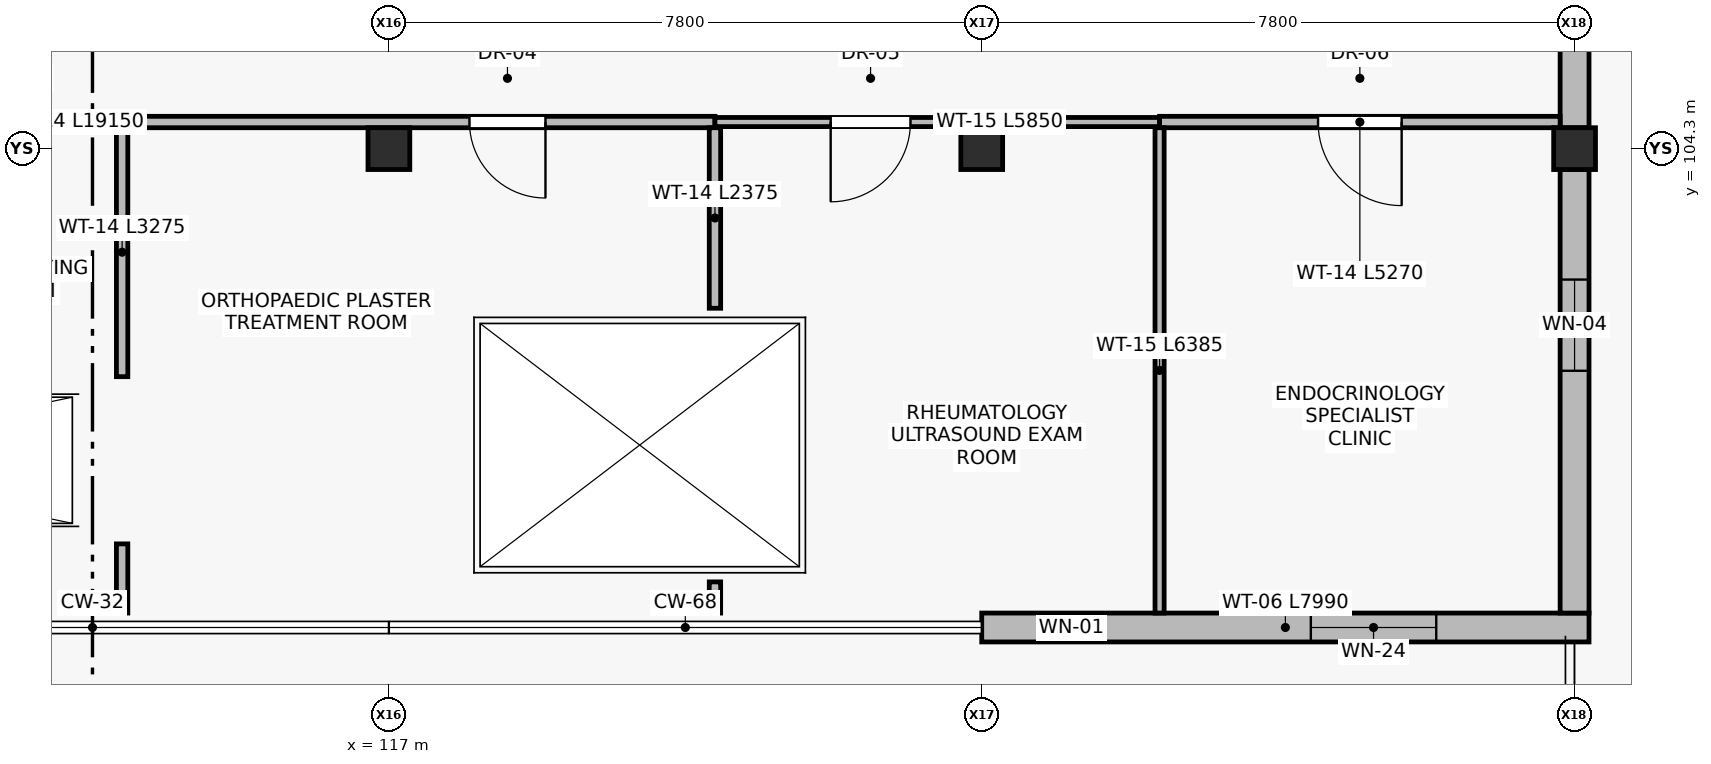
"""IFC4 building model, lengths in metres.
Left out: names, types, materials, properties, quantities, classifications, styles, units other than length and angle.
Written with IfcOpenShell. Run it as: python <this file> out.ifc"""

import sys

from ifc_helpers import new_model, si_unit, direction, frame, frame_2d, origin, origin_2d, place, context, subcontext, project, spatial, rectangle, extrude, element, fill, save


model = new_model("IFC4")
c1 = context("Model", 3, precision=1e-05, world=origin(), true_north=direction((0.0, 1.0)))
c2 = subcontext(c1, "Body", "Model", "MODEL_VIEW")
j1 = project(units=[si_unit("LENGTHUNIT", "METRE"), si_unit("PLANEANGLEUNIT", "RADIAN")], contexts=[c1])
p1 = place(None, origin())
s1 = spatial("IfcSite", under=j1, at=p1, CompositionType="ELEMENT")
p2 = place(p1, origin())
s2 = spatial("IfcBuilding", under=s1, at=p2, CompositionType="ELEMENT")
p3 = place(p2, frame((0.0, 0.0, 9.6)))
s3 = spatial("IfcBuildingStorey", under=s2, at=p3, CompositionType="ELEMENT", Elevation=9.6)
for number, where, z_axis, x_axis in (
    (1, (117.0, 104.3, 0.0), (0.0, 0.0, 1.0), (1.0, 0.0, 0.0)),
    (2, (124.8, 104.3, 0.0), (0.0, 0.0, 1.0), (1.0, 0.0, 0.0)),
    (3, (132.6, 104.3, 0.0), (0.0, 0.0, 1.0), (1.0, 0.0, 0.0)),
):
    element("IfcColumn", number, at=place(p3, frame(where, z_axis=z_axis, x_axis=x_axis)), inside=s3, PredefinedType="COLUMN", context=c2, shape_type="SweptSolid", body=[
        extrude(rectangle(XDim=0.55, YDim=0.55, at=origin_2d()), origin(), (0.0, 0.0, 1.0), 4.5),
    ])
p4 = place(p3, frame((132.79, 98.0, 0.0), z_axis=(0.0, 0.0, 1.0), x_axis=(-1.0, 0.0, 0.0)))
e4 = element("IfcWall", 4, at=p4, inside=s3, PredefinedType="STANDARD", context=c2, shape_type="SweptSolid", body=[
    extrude(rectangle(XDim=7.99, YDim=0.38, at=frame_2d((3.995, 0.0))), origin(), (0.0, 0.0, 1.0), 4.24),
])
p5 = place(p4, frame((2.01, 0.0, 0.9)))
e5 = element("IfcOpeningElement", 5, at=p5, cuts=e4, PredefinedType="OPENING", context=c2, shape_type="SweptSolid", body=[
    extrude(rectangle(XDim=1.65, YDim=1.5, at=frame_2d((0.825, 0.75))), frame((0.0, 0.2, 0.0), z_axis=(0.0, -1.0, 0.0), x_axis=(1.0, 0.0, 0.0)), (0.0, 0.0, 1.0), 0.4),
])
p6 = place(p4, frame((6.36, 0.0, 0.9)))
e6 = element("IfcOpeningElement", 6, at=p6, cuts=e4, PredefinedType="OPENING", context=c2, shape_type="SweptSolid", body=[
    extrude(rectangle(XDim=0.9, YDim=1.6, at=frame_2d((0.45, 0.8))), frame((0.0, 0.2, 0.0), z_axis=(0.0, -1.0, 0.0), x_axis=(1.0, 0.0, 0.0)), (0.0, 0.0, 1.0), 0.4),
])
p7 = place(p3, frame((132.6, 104.025, 0.0), z_axis=(0.0, 0.0, 1.0), x_axis=(0.0, -1.0, 0.0)))
e7 = element("IfcWall", 7, at=p7, inside=s3, PredefinedType="STANDARD", context=c2, shape_type="SweptSolid", body=[
    extrude(rectangle(XDim=5.835, YDim=0.38, at=frame_2d((2.917, 0.0))), origin(), (0.0, 0.0, 1.0), 3.84),
])
p8 = place(p7, frame((1.448, 0.0, 0.9)))
e8 = element("IfcOpeningElement", 8, at=p8, cuts=e7, PredefinedType="OPENING", context=c2, shape_type="SweptSolid", body=[
    extrude(rectangle(XDim=1.2, YDim=1.5, at=frame_2d((0.6, 0.75))), frame((0.0, 0.2, 0.0), z_axis=(0.0, -1.0, 0.0), x_axis=(1.0, 0.0, 0.0)), (0.0, 0.0, 1.0), 0.4),
])
p9 = place(p3, frame((132.6, 107.925, 0.0), z_axis=(0.0, 0.0, 1.0), x_axis=(0.0, -1.0, 0.0)))
e9 = element("IfcWall", 9, at=p9, inside=s3, PredefinedType="STANDARD", context=c2, shape_type="SweptSolid", body=[
    extrude(rectangle(XDim=3.35, YDim=0.38, at=frame_2d((1.675, 0.0))), origin(), (0.0, 0.0, 1.0), 3.84),
])
p10 = place(p9, frame((1.05, 0.0, 0.0)))
e10 = element("IfcOpeningElement", 10, at=p10, cuts=e9, PredefinedType="OPENING", context=c2, shape_type="SweptSolid", body=[
    extrude(rectangle(XDim=1.25, YDim=2.2, at=frame_2d((0.625, 1.1))), frame((0.0, 0.2, 0.0), z_axis=(0.0, -1.0, 0.0), x_axis=(1.0, 0.0, 0.0)), (0.0, 0.0, 1.0), 0.4),
])
p11 = place(p3, frame((113.49, 104.65, 0.0), z_axis=(0.0, 0.0, 1.0), x_axis=(-1.0, 0.0, 0.0)))
e11 = element("IfcWall", 11, at=p11, inside=s3, PredefinedType="PARTITIONING", context=c2, shape_type="SweptSolid", body=[
    extrude(rectangle(XDim=4.95, YDim=0.15, at=frame_2d((2.475, 0.0))), origin(), (0.0, 0.0, 1.0), 3.74),
])
p12 = place(p11, frame((2.025, 0.0, 0.0)))
e12 = element("IfcOpeningElement", 12, at=p12, cuts=e11, PredefinedType="OPENING", context=c2, shape_type="SweptSolid", body=[
    extrude(rectangle(XDim=0.9, YDim=2.1, at=frame_2d((0.45, 1.05))), frame((0.0, 0.085, 0.0), z_axis=(0.0, -1.0, 0.0), x_axis=(1.0, 0.0, 0.0)), (0.0, 0.0, 1.0), 0.17),
])
p13 = place(p3, frame((121.29, 104.65, 0.0), z_axis=(0.0, 0.0, 1.0), x_axis=(-1.0, 0.0, 0.0)))
e13 = element("IfcWall", 13, at=p13, inside=s3, PredefinedType="PARTITIONING", context=c2, shape_type="SweptSolid", body=[
    extrude(rectangle(XDim=7.8, YDim=0.15, at=frame_2d((3.9, 0.0))), origin(), (0.0, 0.0, 1.0), 3.74),
])
p14 = place(p13, frame((2.23, 0.0, 0.0)))
e14 = element("IfcOpeningElement", 14, at=p14, cuts=e13, PredefinedType="OPENING", context=c2, shape_type="SweptSolid", body=[
    extrude(rectangle(XDim=1.0, YDim=2.1, at=frame_2d((0.5, 1.05))), frame((0.0, 0.085, 0.0), z_axis=(0.0, -1.0, 0.0), x_axis=(1.0, 0.0, 0.0)), (0.0, 0.0, 1.0), 0.17),
])
p15 = place(p3, frame((127.14, 104.65, 0.0), z_axis=(0.0, 0.0, 1.0), x_axis=(-1.0, 0.0, 0.0)))
e15 = element("IfcWall", 15, at=p15, inside=s3, PredefinedType="PARTITIONING", context=c2, shape_type="SweptSolid", body=[
    extrude(rectangle(XDim=5.85, YDim=0.12, at=frame_2d((2.925, 0.0))), origin(), (0.0, 0.0, 1.0), 3.74),
])
p16 = place(p15, frame((3.278, 0.0, 0.0)))
e16 = element("IfcOpeningElement", 16, at=p16, cuts=e15, PredefinedType="OPENING", context=c2, shape_type="SweptSolid", body=[
    extrude(rectangle(XDim=1.05, YDim=2.15, at=frame_2d((0.525, 1.075))), frame((0.0, 0.07, 0.0), z_axis=(0.0, -1.0, 0.0), x_axis=(1.0, 0.0, 0.0)), (0.0, 0.0, 1.0), 0.14),
])
p17 = place(p3, frame((132.41, 104.65, 0.0), z_axis=(0.0, 0.0, 1.0), x_axis=(-1.0, 0.0, 0.0)))
e17 = element("IfcWall", 17, at=p17, inside=s3, PredefinedType="PARTITIONING", context=c2, shape_type="SweptSolid", body=[
    extrude(rectangle(XDim=5.27, YDim=0.15, at=frame_2d((2.635, 0.0))), origin(), (0.0, 0.0, 1.0), 3.74),
])
p18 = place(p17, frame((2.085, 0.0, 0.0)))
e18 = element("IfcOpeningElement", 18, at=p18, cuts=e17, PredefinedType="OPENING", context=c2, shape_type="SweptSolid", body=[
    extrude(rectangle(XDim=1.1, YDim=2.15, at=frame_2d((0.55, 1.075))), frame((0.0, 0.085, 0.0), z_axis=(0.0, -1.0, 0.0), x_axis=(1.0, 0.0, 0.0)), (0.0, 0.0, 1.0), 0.17),
])
p19 = place(p3, frame((113.49, 98.19, 0.0), z_axis=(0.0, 0.0, 1.0), x_axis=(0.0, 1.0, 0.0)))
e19 = element("IfcWall", 19, at=p19, inside=s3, PredefinedType="PARTITIONING", context=c2, shape_type="SweptSolid", body=[
    extrude(rectangle(XDim=0.91, YDim=0.15, at=frame_2d((0.455, 0.0))), origin(), (0.0, 0.0, 1.0), 4.24),
])
p20 = place(p3, frame((113.49, 101.3, 0.0), z_axis=(0.0, 0.0, 1.0), x_axis=(0.0, 1.0, 0.0)))
e20 = element("IfcWall", 20, at=p20, inside=s3, PredefinedType="PARTITIONING", context=c2, shape_type="SweptSolid", body=[
    extrude(rectangle(XDim=3.275, YDim=0.15, at=frame_2d((1.637, 0.0))), origin(), (0.0, 0.0, 1.0), 4.24),
])
p21 = place(p3, frame((121.29, 98.19, 0.0), z_axis=(0.0, 0.0, 1.0), x_axis=(0.0, 1.0, 0.0)))
e21 = element("IfcWall", 21, at=p21, inside=s3, PredefinedType="PARTITIONING", context=c2, shape_type="SweptSolid", body=[
    extrude(rectangle(XDim=0.41, YDim=0.15, at=frame_2d((0.205, 0.0))), origin(), (0.0, 0.0, 1.0), 4.24),
])
p22 = place(p3, frame((121.29, 102.2, 0.0), z_axis=(0.0, 0.0, 1.0), x_axis=(0.0, 1.0, 0.0)))
e22 = element("IfcWall", 22, at=p22, inside=s3, PredefinedType="PARTITIONING", context=c2, shape_type="SweptSolid", body=[
    extrude(rectangle(XDim=2.375, YDim=0.15, at=frame_2d((1.188, 0.0))), origin(), (0.0, 0.0, 1.0), 4.24),
])
p23 = place(p3, frame((127.14, 98.19, 0.0), z_axis=(0.0, 0.0, 1.0), x_axis=(0.0, 1.0, 0.0)))
e23 = element("IfcWall", 23, at=p23, inside=s3, PredefinedType="PARTITIONING", context=c2, shape_type="SweptSolid", body=[
    extrude(rectangle(XDim=6.385, YDim=0.12, at=frame_2d((3.192, 0.0))), origin(), (0.0, 0.0, 1.0), 3.94),
])
p24 = place(p5, origin())
e24 = element("IfcWindow", 24, at=p24, inside=s3, PartitioningType="SINGLE_PANEL", PredefinedType="WINDOW", context=c2, shape_type="SweptSolid", body=[
    extrude(rectangle(XDim=1.65, YDim=1.5, at=frame_2d((0.825, 0.75))), frame((0.0, 0.03, 0.0), z_axis=(0.0, -1.0, 0.0), x_axis=(1.0, 0.0, 0.0)), (0.0, 0.0, 1.0), 0.06),
])
fill(e5, e24)
p25 = place(p6, origin())
e25 = element("IfcWindow", 25, at=p25, inside=s3, PartitioningType="SINGLE_PANEL", PredefinedType="WINDOW", context=c2, shape_type="SweptSolid", body=[
    extrude(rectangle(XDim=0.9, YDim=1.6, at=frame_2d((0.45, 0.8))), frame((0.0, 0.03, 0.0), z_axis=(0.0, -1.0, 0.0), x_axis=(1.0, 0.0, 0.0)), (0.0, 0.0, 1.0), 0.06),
])
fill(e6, e25)
p26 = place(p8, origin())
e26 = element("IfcWindow", 26, at=p26, inside=s3, PartitioningType="SINGLE_PANEL", PredefinedType="WINDOW", context=c2, shape_type="SweptSolid", body=[
    extrude(rectangle(XDim=1.2, YDim=1.5, at=frame_2d((0.6, 0.75))), frame((0.0, 0.03, 0.0), z_axis=(0.0, -1.0, 0.0), x_axis=(1.0, 0.0, 0.0)), (0.0, 0.0, 1.0), 0.06),
])
fill(e8, e26)
p27 = place(p14, origin())
e27 = element("IfcDoor", 27, at=p27, inside=s3, OperationType="SINGLE_SWING_LEFT", PredefinedType="DOOR", context=c2, shape_type="SweptSolid", body=[
    extrude(rectangle(XDim=1.0, YDim=2.1, at=frame_2d((0.5, 1.05))), frame((0.0, 0.025, 0.0), z_axis=(0.0, -1.0, 0.0), x_axis=(1.0, 0.0, 0.0)), (0.0, 0.0, 1.0), 0.05),
])
fill(e14, e27)
p28 = place(p16, origin())
e28 = element("IfcDoor", 28, at=p28, inside=s3, OperationType="SINGLE_SWING_RIGHT", PredefinedType="DOOR", context=c2, shape_type="SweptSolid", body=[
    extrude(rectangle(XDim=1.05, YDim=2.15, at=frame_2d((0.525, 1.075))), frame((0.0, 0.025, 0.0), z_axis=(0.0, -1.0, 0.0), x_axis=(1.0, 0.0, 0.0)), (0.0, 0.0, 1.0), 0.05),
])
fill(e16, e28)
p29 = place(p18, origin())
e29 = element("IfcDoor", 29, at=p29, inside=s3, OperationType="SINGLE_SWING_LEFT", PredefinedType="DOOR", context=c2, shape_type="SweptSolid", body=[
    extrude(rectangle(XDim=1.1, YDim=2.15, at=frame_2d((0.55, 1.075))), frame((0.0, 0.025, 0.0), z_axis=(0.0, -1.0, 0.0), x_axis=(1.0, 0.0, 0.0)), (0.0, 0.0, 1.0), 0.05),
])
fill(e18, e29)
save(model, sys.argv[1])
